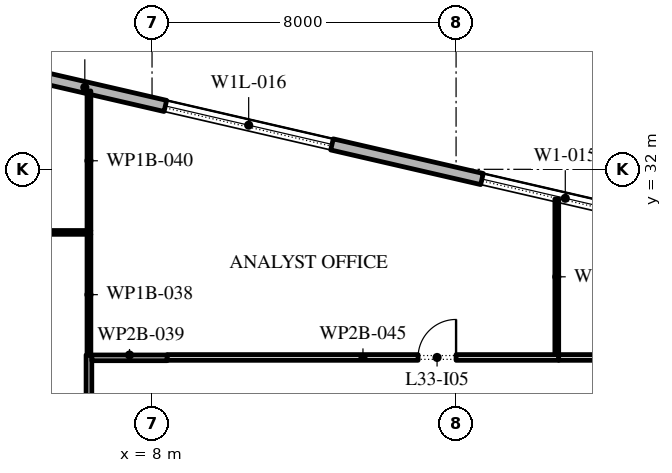
"""IFC4 building model, lengths in metres.
Left out: names, types, materials, properties, quantities, classifications, styles, units other than length and angle.
Written with IfcOpenShell. Run it as: python <this file> out.ifc"""

import sys

from ifc_helpers import new_model, si_unit, direction, frame, frame_2d, origin, place, context, subcontext, project, spatial, rectangle, extrude, element, fill, save


model = new_model("IFC4")
c1 = context("Model", 3, precision=1e-05, world=origin(), true_north=direction((0.0, 1.0)))
c2 = subcontext(c1, "Body", "Model", "MODEL_VIEW")
j1 = project(units=[si_unit("LENGTHUNIT", "METRE"), si_unit("PLANEANGLEUNIT", "RADIAN")], contexts=[c1])
p1 = place(None, origin())
s1 = spatial("IfcSite", under=j1, at=p1, CompositionType="ELEMENT")
p2 = place(p1, origin())
s2 = spatial("IfcBuilding", under=s1, at=p2, CompositionType="ELEMENT")
p3 = place(p2, frame((0.0, 0.0, 151.8)))
s3 = spatial("IfcBuildingStorey", under=s2, at=p3, CompositionType="ELEMENT", Elevation=151.8)
p4 = place(p3, frame((31.078, 28.421, 0.0), z_axis=(0.0, 0.0, 1.0), x_axis=(-0.974370456532, 0.224949357493, 0.0)))
e1 = element("IfcWall", 1, at=p4, inside=s3, PredefinedType="STANDARD", context=c2, shape_type="SweptSolid", body=[
    extrude(rectangle(XDim=51.0, YDim=0.3, at=frame_2d((25.5, 0.0))), origin(), (0.0, 0.0, 1.0), 3.95),
])
p5 = place(p4, frame((1.875, 0.0, 0.45)))
e2 = element("IfcOpeningElement", 2, at=p5, cuts=e1, PredefinedType="OPENING", context=c2, shape_type="SweptSolid", body=[
    extrude(rectangle(XDim=4.5, YDim=2.775, at=frame_2d((2.25, 1.387))), frame((0.0, 0.16, 0.0), z_axis=(0.0, -1.0, 0.0), x_axis=(1.0, 0.0, 0.0)), (0.0, 0.0, 1.0), 0.32),
])
p6 = place(p4, frame((10.275, 0.0, 0.45)))
e3 = element("IfcOpeningElement", 3, at=p6, cuts=e1, PredefinedType="OPENING", context=c2, shape_type="SweptSolid", body=[
    extrude(rectangle(XDim=4.5, YDim=3.05, at=frame_2d((2.25, 1.525))), frame((0.0, 0.16, 0.0), z_axis=(0.0, -1.0, 0.0), x_axis=(1.0, 0.0, 0.0)), (0.0, 0.0, 1.0), 0.32),
])
p7 = place(p4, frame((18.825, 0.0, 0.45)))
e4 = element("IfcOpeningElement", 4, at=p7, cuts=e1, PredefinedType="OPENING", context=c2, shape_type="SweptSolid", body=[
    extrude(rectangle(XDim=4.5, YDim=2.625, at=frame_2d((2.25, 1.312))), frame((0.0, 0.16, 0.0), z_axis=(0.0, -1.0, 0.0), x_axis=(1.0, 0.0, 0.0)), (0.0, 0.0, 1.0), 0.32),
])
p8 = place(p4, frame((28.425, 0.0, 0.0)))
e5 = element("IfcOpeningElement", 5, at=p8, cuts=e1, PredefinedType="OPENING", context=c2, shape_type="SweptSolid", body=[
    extrude(rectangle(XDim=2.4, YDim=3.5, at=frame_2d((1.2, 1.75))), frame((0.0, 0.16, 0.0), z_axis=(0.0, -1.0, 0.0), x_axis=(1.0, 0.0, 0.0)), (0.0, 0.0, 1.0), 0.32),
])
p9 = place(p4, frame((35.925, 0.0, 0.45)))
e6 = element("IfcOpeningElement", 6, at=p9, cuts=e1, PredefinedType="OPENING", context=c2, shape_type="SweptSolid", body=[
    extrude(rectangle(XDim=4.5, YDim=2.475, at=frame_2d((2.25, 1.238))), frame((0.0, 0.16, 0.0), z_axis=(0.0, -1.0, 0.0), x_axis=(1.0, 0.0, 0.0)), (0.0, 0.0, 1.0), 0.32),
])
p10 = place(p4, frame((44.475, 0.0, 0.45)))
e7 = element("IfcOpeningElement", 7, at=p10, cuts=e1, PredefinedType="OPENING", context=c2, shape_type="SweptSolid", body=[
    extrude(rectangle(XDim=4.5, YDim=2.4, at=frame_2d((2.25, 1.2))), frame((0.0, 0.16, 0.0), z_axis=(0.0, -1.0, 0.0), x_axis=(1.0, 0.0, 0.0)), (0.0, 0.0, 1.0), 0.32),
])
p11 = place(p3, frame((-6.29, 30.34, 0.0), z_axis=(0.0, 0.0, 1.0), x_axis=(1.0, 0.0, 0.0)))
e8 = element("IfcWall", 8, at=p11, inside=s3, PredefinedType="PARTITIONING", context=c2, shape_type="SweptSolid", body=[
    extrude(rectangle(XDim=12.68, YDim=0.1, at=frame_2d((6.34, 0.0))), origin(), (0.0, 0.0, 1.0), 3.95),
])
p12 = place(p11, frame((8.28, 0.0, 0.0)))
e9 = element("IfcOpeningElement", 9, at=p12, cuts=e8, PredefinedType="OPENING", context=c2, shape_type="SweptSolid", body=[
    extrude(rectangle(XDim=0.9, YDim=2.1, at=frame_2d((0.45, 1.05))), frame((0.0, 0.06, 0.0), z_axis=(0.0, -1.0, 0.0), x_axis=(1.0, 0.0, 0.0)), (0.0, 0.0, 1.0), 0.12),
])
p13 = place(p3, frame((6.34, 23.46, 0.0), z_axis=(0.0, 0.0, 1.0), x_axis=(0.0, 1.0, 0.0)))
e10 = element("IfcWall", 10, at=p13, inside=s3, PredefinedType="PARTITIONING", context=c2, shape_type="SweptSolid", body=[
    extrude(rectangle(XDim=3.655, YDim=0.15, at=frame_2d((1.828, 0.0))), origin(), (0.0, 0.0, 1.0), 3.95),
])
p14 = place(p3, frame((6.34, 27.115, 0.0), z_axis=(0.0, 0.0, 1.0), x_axis=(0.0, 1.0, 0.0)))
e11 = element("IfcWall", 11, at=p14, inside=s3, PredefinedType="PARTITIONING", context=c2, shape_type="SweptSolid", body=[
    extrude(rectangle(XDim=3.175, YDim=0.1, at=frame_2d((1.587, 0.0))), origin(), (0.0, 0.0, 1.0), 3.95),
])
p15 = place(p3, frame((6.415, 27.04, 0.0), z_axis=(0.0, 0.0, 1.0), x_axis=(1.0, 0.0, 0.0)))
e12 = element("IfcWall", 12, at=p15, inside=s3, PredefinedType="PARTITIONING", context=c2, shape_type="SweptSolid", body=[
    extrude(rectangle(XDim=1.985, YDim=0.15, at=frame_2d((0.992, 0.0))), origin(), (0.0, 0.0, 1.0), 3.95),
])
p16 = place(p3, frame((6.34, 30.39, 0.0), z_axis=(0.0, 0.0, 1.0), x_axis=(0.0, 1.0, 0.0)))
e13 = element("IfcWall", 13, at=p16, inside=s3, PredefinedType="PARTITIONING", context=c2, shape_type="SweptSolid", body=[
    extrude(rectangle(XDim=3.671, YDim=0.1, at=frame_2d((1.835, 0.0))), origin(), (0.0, 0.0, 1.0), 3.95),
])
p17 = place(p3, frame((8.4, 27.05, 0.0), z_axis=(0.0, 0.0, 1.0), x_axis=(1.0, 0.0, 0.0)))
e14 = element("IfcWall", 14, at=p17, inside=s3, PredefinedType="PARTITIONING", context=c2, shape_type="SweptSolid", body=[
    extrude(rectangle(XDim=10.3, YDim=0.15, at=frame_2d((5.15, 0.0))), origin(), (0.0, 0.0, 1.0), 3.95),
])
p18 = place(p17, frame((6.6, 0.0, 0.0)))
e15 = element("IfcOpeningElement", 15, at=p18, cuts=e14, PredefinedType="OPENING", context=c2, shape_type="SweptSolid", body=[
    extrude(rectangle(XDim=1.0, YDim=2.1, at=frame_2d((0.5, 1.05))), frame((0.0, 0.085, 0.0), z_axis=(0.0, -1.0, 0.0), x_axis=(1.0, 0.0, 0.0)), (0.0, 0.0, 1.0), 0.17),
])
p19 = place(p3, frame((18.65, 27.125, 0.0), z_axis=(0.0, 0.0, 1.0), x_axis=(0.0, 1.0, 0.0)))
e16 = element("IfcWall", 16, at=p19, inside=s3, PredefinedType="PARTITIONING", context=c2, shape_type="SweptSolid", body=[
    extrude(rectangle(XDim=4.094, YDim=0.1, at=frame_2d((2.047, 0.0))), origin(), (0.0, 0.0, 1.0), 3.95),
])
p20 = place(p3, frame((18.7, 27.05, 0.0), z_axis=(0.0, 0.0, 1.0), x_axis=(1.0, 0.0, 0.0)))
e17 = element("IfcWall", 17, at=p20, inside=s3, PredefinedType="PARTITIONING", context=c2, shape_type="SweptSolid", body=[
    extrude(rectangle(XDim=4.975, YDim=0.15, at=frame_2d((2.488, 0.0))), origin(), (0.0, 0.0, 1.0), 3.95),
])
p21 = place(p20, frame((1.5, 0.0, 0.0)))
e18 = element("IfcOpeningElement", 18, at=p21, cuts=e17, PredefinedType="OPENING", context=c2, shape_type="SweptSolid", body=[
    extrude(rectangle(XDim=1.0, YDim=2.1, at=frame_2d((0.5, 1.05))), frame((0.0, 0.085, 0.0), z_axis=(0.0, -1.0, 0.0), x_axis=(1.0, 0.0, 0.0)), (0.0, 0.0, 1.0), 0.17),
])
p22 = place(p6, origin())
e19 = element("IfcWindow", 19, at=p22, inside=s3, PartitioningType="DOUBLE_PANEL_VERTICAL", PredefinedType="WINDOW", context=c2, shape_type="SweptSolid", body=[
    extrude(rectangle(XDim=4.5, YDim=3.05, at=frame_2d((2.25, 1.525))), frame((0.0, 0.03, 0.0), z_axis=(0.0, -1.0, 0.0), x_axis=(1.0, 0.0, 0.0)), (0.0, 0.0, 1.0), 0.06),
])
fill(e3, e19)
p23 = place(p7, origin())
e20 = element("IfcWindow", 20, at=p23, inside=s3, PartitioningType="DOUBLE_PANEL_VERTICAL", PredefinedType="WINDOW", context=c2, shape_type="SweptSolid", body=[
    extrude(rectangle(XDim=4.5, YDim=2.625, at=frame_2d((2.25, 1.312))), frame((0.0, 0.03, 0.0), z_axis=(0.0, -1.0, 0.0), x_axis=(1.0, 0.0, 0.0)), (0.0, 0.0, 1.0), 0.06),
])
fill(e4, e20)
p24 = place(p18, origin())
e21 = element("IfcDoor", 21, at=p24, inside=s3, OperationType="SINGLE_SWING_LEFT", PredefinedType="DOOR", context=c2, shape_type="SweptSolid", body=[
    extrude(rectangle(XDim=1.0, YDim=2.1, at=frame_2d((0.5, 1.05))), frame((0.0, 0.025, 0.0), z_axis=(0.0, -1.0, 0.0), x_axis=(1.0, 0.0, 0.0)), (0.0, 0.0, 1.0), 0.05),
])
fill(e15, e21)
save(model, sys.argv[1])
